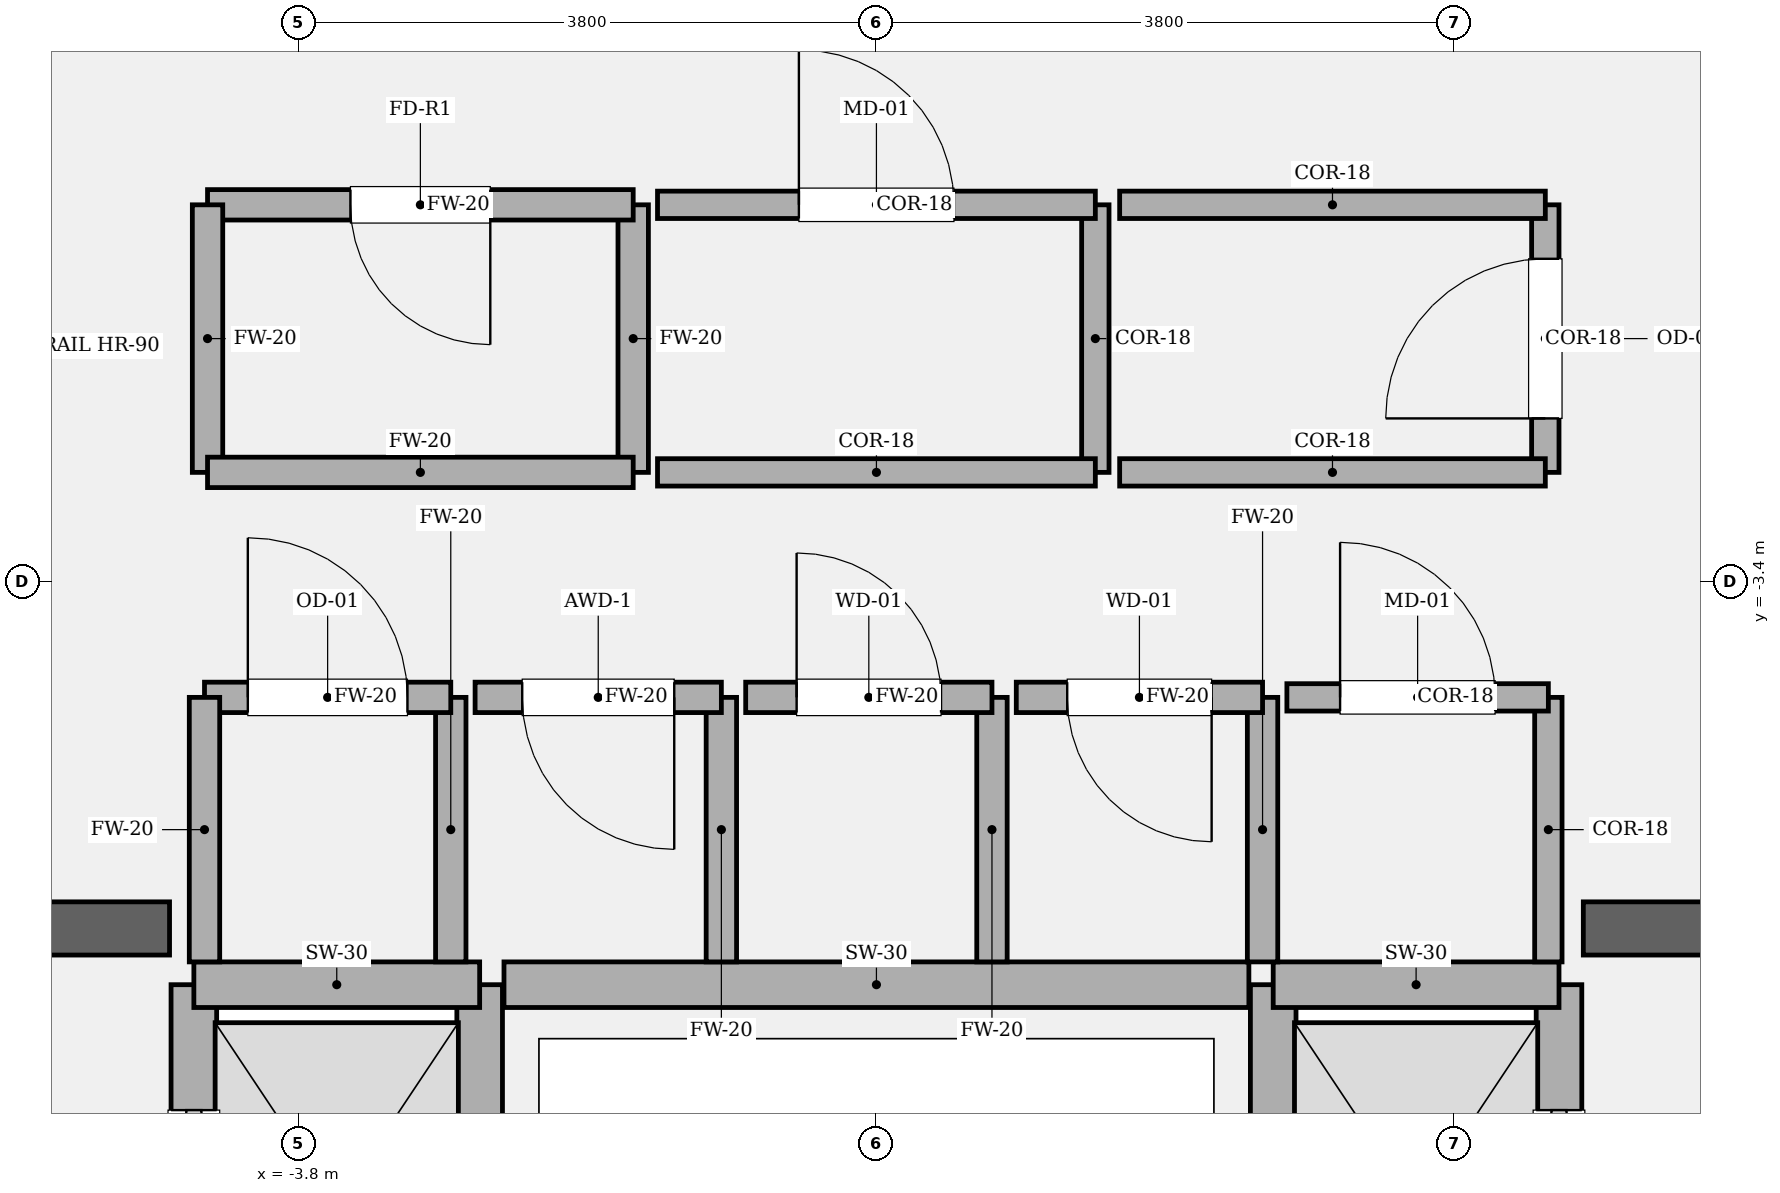
"""IFC4 building model, lengths in metres.
Left out: names, types, materials, properties, quantities, classifications, styles, units other than length and angle.
Written with IfcOpenShell. Run it as: python <this file> out.ifc"""

import sys

from ifc_helpers import new_model, si_unit, direction, frame, frame_2d, origin, place, context, subcontext, project, spatial, rectangle, extrude, element, fill, save


model = new_model("IFC4")
c1 = context("Model", 3, precision=1e-05, world=origin(), true_north=direction((0.0, 1.0)))
c2 = subcontext(c1, "Body", "Model", "MODEL_VIEW")
j1 = project(units=[si_unit("LENGTHUNIT", "METRE"), si_unit("PLANEANGLEUNIT", "RADIAN")], contexts=[c1])
p1 = place(None, origin())
s1 = spatial("IfcSite", under=j1, at=p1, CompositionType="ELEMENT")
p2 = place(p1, origin())
s2 = spatial("IfcBuilding", under=s1, at=p2, CompositionType="ELEMENT")
p3 = place(p2, frame((0.0, 0.0, 212.7)))
s3 = spatial("IfcBuildingStorey", under=s2, at=p3, CompositionType="ELEMENT", Elevation=212.7)
p4 = place(p3, frame((-9.875, -5.68, 0.0), z_axis=(0.0, 0.0, 1.0), x_axis=(1.0, 0.0, 0.0)))
e1 = element("IfcWall", 1, at=p4, inside=s3, PredefinedType="SOLIDWALL", context=c2, shape_type="SweptSolid", body=[
    extrude(rectangle(XDim=5.225, YDim=0.35, at=frame_2d((2.613, 0.0))), origin(), (0.0, 0.0, 1.0), 4.05),
])
p5 = place(p4, frame((1.335, 0.0, 0.0)))
e2 = element("IfcOpeningElement", 2, at=p5, cuts=e1, PredefinedType="OPENING", context=c2, shape_type="SweptSolid", body=[
    extrude(rectangle(XDim=1.18, YDim=2.2, at=frame_2d((0.59, 1.1))), frame((0.0, 0.185, 0.0), z_axis=(0.0, -1.0, 0.0), x_axis=(1.0, 0.0, 0.0)), (0.0, 0.0, 1.0), 0.37),
])
p6 = place(p3, frame((4.65, -5.68, 0.0), z_axis=(0.0, 0.0, 1.0), x_axis=(1.0, 0.0, 0.0)))
e3 = element("IfcWall", 3, at=p6, inside=s3, PredefinedType="SOLIDWALL", context=c2, shape_type="SweptSolid", body=[
    extrude(rectangle(XDim=5.225, YDim=0.35, at=frame_2d((2.613, 0.0))), origin(), (0.0, 0.0, 1.0), 4.05),
])
p7 = place(p6, frame((2.71, 0.0, 0.0)))
e4 = element("IfcOpeningElement", 4, at=p7, cuts=e3, PredefinedType="OPENING", context=c2, shape_type="SweptSolid", body=[
    extrude(rectangle(XDim=1.18, YDim=2.2, at=frame_2d((0.59, 1.1))), frame((0.0, 0.185, 0.0), z_axis=(0.0, -1.0, 0.0), x_axis=(1.0, 0.0, 0.0)), (0.0, 0.0, 1.0), 0.37),
])
p8 = place(p3, frame((-4.49, -8.82, 0.0), z_axis=(0.0, 0.0, 1.0), x_axis=(0.0, 1.0, 0.0)))
e5 = element("IfcWall", 5, at=p8, inside=s3, PredefinedType="SOLIDWALL", context=c2, shape_type="SweptSolid", body=[
    extrude(rectangle(XDim=2.77, YDim=0.3, at=frame_2d((1.385, 0.0))), origin(), (0.0, 0.0, 1.0), 3.83),
])
p9 = place(p8, frame((0.825, 0.0, 0.0)))
e6 = element("IfcOpeningElement", 6, at=p9, cuts=e5, PredefinedType="OPENING", context=c2, shape_type="SweptSolid", body=[
    extrude(rectangle(XDim=1.12, YDim=2.25, at=frame_2d((0.56, 1.125))), frame((0.0, 0.16, 0.0), z_axis=(0.0, -1.0, 0.0), x_axis=(1.0, 0.0, 0.0)), (0.0, 0.0, 1.0), 0.32),
])
p10 = place(p3, frame((-2.61, -8.82, 0.0), z_axis=(0.0, 0.0, 1.0), x_axis=(0.0, 1.0, 0.0)))
e7 = element("IfcWall", 7, at=p10, inside=s3, PredefinedType="SOLIDWALL", context=c2, shape_type="SweptSolid", body=[
    extrude(rectangle(XDim=2.77, YDim=0.3, at=frame_2d((1.385, 0.0))), origin(), (0.0, 0.0, 1.0), 3.83),
])
p11 = place(p3, frame((-4.49, -6.05, 0.0), z_axis=(0.0, 0.0, 1.0), x_axis=(1.0, 0.0, 0.0)))
e8 = element("IfcWall", 8, at=p11, inside=s3, PredefinedType="SOLIDWALL", context=c2, shape_type="SweptSolid", body=[
    extrude(rectangle(XDim=1.88, YDim=0.3, at=frame_2d((0.94, 0.0))), origin(), (0.0, 0.0, 1.0), 3.83),
])
p12 = place(p3, frame((4.49, -8.82, 0.0), z_axis=(0.0, 0.0, 1.0), x_axis=(0.0, 1.0, 0.0)))
e9 = element("IfcWall", 9, at=p12, inside=s3, PredefinedType="SOLIDWALL", context=c2, shape_type="SweptSolid", body=[
    extrude(rectangle(XDim=2.77, YDim=0.3, at=frame_2d((1.385, 0.0))), origin(), (0.0, 0.0, 1.0), 3.83),
])
p13 = place(p12, frame((0.825, 0.0, 0.0)))
e10 = element("IfcOpeningElement", 10, at=p13, cuts=e9, PredefinedType="OPENING", context=c2, shape_type="SweptSolid", body=[
    extrude(rectangle(XDim=1.12, YDim=2.25, at=frame_2d((0.56, 1.125))), frame((0.0, 0.16, 0.0), z_axis=(0.0, -1.0, 0.0), x_axis=(1.0, 0.0, 0.0)), (0.0, 0.0, 1.0), 0.32),
])
p14 = place(p3, frame((2.61, -8.82, 0.0), z_axis=(0.0, 0.0, 1.0), x_axis=(0.0, 1.0, 0.0)))
e11 = element("IfcWall", 11, at=p14, inside=s3, PredefinedType="SOLIDWALL", context=c2, shape_type="SweptSolid", body=[
    extrude(rectangle(XDim=2.77, YDim=0.3, at=frame_2d((1.385, 0.0))), origin(), (0.0, 0.0, 1.0), 3.83),
])
p15 = place(p3, frame((2.61, -6.05, 0.0), z_axis=(0.0, 0.0, 1.0), x_axis=(1.0, 0.0, 0.0)))
e12 = element("IfcWall", 12, at=p15, inside=s3, PredefinedType="SOLIDWALL", context=c2, shape_type="SweptSolid", body=[
    extrude(rectangle(XDim=1.88, YDim=0.3, at=frame_2d((0.94, 0.0))), origin(), (0.0, 0.0, 1.0), 3.83),
])
p16 = place(p3, frame((-2.45, -6.05, 0.0), z_axis=(0.0, 0.0, 1.0), x_axis=(1.0, 0.0, 0.0)))
e13 = element("IfcWall", 13, at=p16, inside=s3, PredefinedType="SOLIDWALL", context=c2, shape_type="SweptSolid", body=[
    extrude(rectangle(XDim=4.9, YDim=0.3, at=frame_2d((2.45, 0.0))), origin(), (0.0, 0.0, 1.0), 3.83),
])
p17 = place(p3, frame((-2.8, -5.9, 0.0), z_axis=(0.0, 0.0, 1.0), x_axis=(0.0, 1.0, 0.0)))
e14 = element("IfcWall", 14, at=p17, inside=s3, PredefinedType="SOLIDWALL", context=c2, shape_type="SweptSolid", body=[
    extrude(rectangle(XDim=1.74, YDim=0.2, at=frame_2d((0.87, 0.0))), origin(), (0.0, 0.0, 1.0), 3.83),
])
p18 = place(p3, frame((-2.8, -4.16, 0.0), z_axis=(0.0, 0.0, 1.0), x_axis=(-1.0, 0.0, 0.0)))
e15 = element("IfcWall", 15, at=p18, inside=s3, PredefinedType="SOLIDWALL", context=c2, shape_type="SweptSolid", body=[
    extrude(rectangle(XDim=1.62, YDim=0.2, at=frame_2d((0.81, 0.0))), origin(), (0.0, 0.0, 1.0), 3.83),
])
p19 = place(p18, frame((0.285, 0.0, 0.0)))
e16 = element("IfcOpeningElement", 16, at=p19, cuts=e15, PredefinedType="OPENING", context=c2, shape_type="SweptSolid", body=[
    extrude(rectangle(XDim=1.05, YDim=2.2, at=frame_2d((0.525, 1.1))), frame((0.0, 0.11, 0.0), z_axis=(0.0, -1.0, 0.0), x_axis=(1.0, 0.0, 0.0)), (0.0, 0.0, 1.0), 0.22),
])
for number, where, z_axis, x_axis in (
    (17, (-4.42, -4.16, 0.0), (0.0, 0.0, 1.0), (0.0, -1.0, 0.0)),
    (18, (-1.02, -5.9, 0.0), (0.0, 0.0, 1.0), (0.0, 1.0, 0.0)),
):
    element("IfcWall", number, at=place(p3, frame(where, z_axis=z_axis, x_axis=x_axis)), inside=s3, PredefinedType="SOLIDWALL", context=c2, shape_type="SweptSolid", body=[
        extrude(rectangle(XDim=1.74, YDim=0.2, at=frame_2d((0.87, 0.0))), origin(), (0.0, 0.0, 1.0), 3.83),
    ])
p20 = place(p3, frame((-1.02, -4.16, 0.0), z_axis=(0.0, 0.0, 1.0), x_axis=(-1.0, 0.0, 0.0)))
e19 = element("IfcWall", 19, at=p20, inside=s3, PredefinedType="SOLIDWALL", context=c2, shape_type="SweptSolid", body=[
    extrude(rectangle(XDim=1.62, YDim=0.2, at=frame_2d((0.81, 0.0))), origin(), (0.0, 0.0, 1.0), 3.83),
])
p21 = place(p20, frame((0.31, 0.0, 0.0)))
e20 = element("IfcOpeningElement", 20, at=p21, cuts=e19, PredefinedType="OPENING", context=c2, shape_type="SweptSolid", body=[
    extrude(rectangle(XDim=1.0, YDim=2.15, at=frame_2d((0.5, 1.075))), frame((0.0, 0.11, 0.0), z_axis=(0.0, -1.0, 0.0), x_axis=(1.0, 0.0, 0.0)), (0.0, 0.0, 1.0), 0.22),
])
p22 = place(p3, frame((0.76, -5.9, 0.0), z_axis=(0.0, 0.0, 1.0), x_axis=(0.0, 1.0, 0.0)))
e21 = element("IfcWall", 21, at=p22, inside=s3, PredefinedType="SOLIDWALL", context=c2, shape_type="SweptSolid", body=[
    extrude(rectangle(XDim=1.74, YDim=0.2, at=frame_2d((0.87, 0.0))), origin(), (0.0, 0.0, 1.0), 3.83),
])
p23 = place(p3, frame((0.76, -4.16, 0.0), z_axis=(0.0, 0.0, 1.0), x_axis=(-1.0, 0.0, 0.0)))
e22 = element("IfcWall", 22, at=p23, inside=s3, PredefinedType="SOLIDWALL", context=c2, shape_type="SweptSolid", body=[
    extrude(rectangle(XDim=1.62, YDim=0.2, at=frame_2d((0.81, 0.0))), origin(), (0.0, 0.0, 1.0), 3.83),
])
p24 = place(p23, frame((0.335, 0.0, 0.0)))
e23 = element("IfcOpeningElement", 23, at=p24, cuts=e22, PredefinedType="OPENING", context=c2, shape_type="SweptSolid", body=[
    extrude(rectangle(XDim=0.95, YDim=2.15, at=frame_2d((0.475, 1.075))), frame((0.0, 0.11, 0.0), z_axis=(0.0, -1.0, 0.0), x_axis=(1.0, 0.0, 0.0)), (0.0, 0.0, 1.0), 0.22),
])
p25 = place(p3, frame((2.54, -5.9, 0.0), z_axis=(0.0, 0.0, 1.0), x_axis=(0.0, 1.0, 0.0)))
e24 = element("IfcWall", 24, at=p25, inside=s3, PredefinedType="SOLIDWALL", context=c2, shape_type="SweptSolid", body=[
    extrude(rectangle(XDim=1.74, YDim=0.2, at=frame_2d((0.87, 0.0))), origin(), (0.0, 0.0, 1.0), 3.83),
])
p26 = place(p3, frame((2.54, -4.16, 0.0), z_axis=(0.0, 0.0, 1.0), x_axis=(-1.0, 0.0, 0.0)))
e25 = element("IfcWall", 25, at=p26, inside=s3, PredefinedType="SOLIDWALL", context=c2, shape_type="SweptSolid", body=[
    extrude(rectangle(XDim=1.62, YDim=0.2, at=frame_2d((0.81, 0.0))), origin(), (0.0, 0.0, 1.0), 3.83),
])
p27 = place(p26, frame((0.335, 0.0, 0.0)))
e26 = element("IfcOpeningElement", 26, at=p27, cuts=e25, PredefinedType="OPENING", context=c2, shape_type="SweptSolid", body=[
    extrude(rectangle(XDim=0.95, YDim=2.15, at=frame_2d((0.475, 1.075))), frame((0.0, 0.11, 0.0), z_axis=(0.0, -1.0, 0.0), x_axis=(1.0, 0.0, 0.0)), (0.0, 0.0, 1.0), 0.22),
])
p28 = place(p3, frame((4.42, -5.9, 0.0), z_axis=(0.0, 0.0, 1.0), x_axis=(0.0, 1.0, 0.0)))
e27 = element("IfcWall", 27, at=p28, inside=s3, PredefinedType="PARTITIONING", context=c2, shape_type="SweptSolid", body=[
    extrude(rectangle(XDim=1.74, YDim=0.18, at=frame_2d((0.87, 0.0))), origin(), (0.0, 0.0, 1.0), 3.83),
])
p29 = place(p3, frame((4.42, -4.16, 0.0), z_axis=(0.0, 0.0, 1.0), x_axis=(-1.0, 0.0, 0.0)))
e28 = element("IfcWall", 28, at=p29, inside=s3, PredefinedType="PARTITIONING", context=c2, shape_type="SweptSolid", body=[
    extrude(rectangle(XDim=1.72, YDim=0.18, at=frame_2d((0.86, 0.0))), origin(), (0.0, 0.0, 1.0), 3.83),
])
p30 = place(p29, frame((0.35, 0.0, 0.0)))
e29 = element("IfcOpeningElement", 29, at=p30, cuts=e28, PredefinedType="OPENING", context=c2, shape_type="SweptSolid", body=[
    extrude(rectangle(XDim=1.02, YDim=2.2, at=frame_2d((0.51, 1.1))), frame((0.0, 0.1, 0.0), z_axis=(0.0, -1.0, 0.0), x_axis=(1.0, 0.0, 0.0)), (0.0, 0.0, 1.0), 0.2),
])
p31 = place(p3, frame((-1.6, -2.68, 0.0), z_axis=(0.0, 0.0, 1.0), x_axis=(0.0, 1.0, 0.0)))
e30 = element("IfcWall", 30, at=p31, inside=s3, PredefinedType="SOLIDWALL", context=c2, shape_type="SweptSolid", body=[
    extrude(rectangle(XDim=1.76, YDim=0.2, at=frame_2d((0.88, 0.0))), origin(), (0.0, 0.0, 1.0), 3.83),
])
p32 = place(p3, frame((-1.6, -0.92, 0.0), z_axis=(0.0, 0.0, 1.0), x_axis=(-1.0, 0.0, 0.0)))
e31 = element("IfcWall", 31, at=p32, inside=s3, PredefinedType="SOLIDWALL", context=c2, shape_type="SweptSolid", body=[
    extrude(rectangle(XDim=2.8, YDim=0.2, at=frame_2d((1.4, 0.0))), origin(), (0.0, 0.0, 1.0), 3.83),
])
p33 = place(p32, frame((0.94, 0.0, 0.0)))
e32 = element("IfcOpeningElement", 32, at=p33, cuts=e31, PredefinedType="OPENING", context=c2, shape_type="SweptSolid", body=[
    extrude(rectangle(XDim=0.92, YDim=2.1, at=frame_2d((0.46, 1.05))), frame((0.0, 0.11, 0.0), z_axis=(0.0, -1.0, 0.0), x_axis=(1.0, 0.0, 0.0)), (0.0, 0.0, 1.0), 0.22),
])
p34 = place(p3, frame((-4.4, -0.92, 0.0), z_axis=(0.0, 0.0, 1.0), x_axis=(0.0, -1.0, 0.0)))
e33 = element("IfcWall", 33, at=p34, inside=s3, PredefinedType="SOLIDWALL", context=c2, shape_type="SweptSolid", body=[
    extrude(rectangle(XDim=1.76, YDim=0.2, at=frame_2d((0.88, 0.0))), origin(), (0.0, 0.0, 1.0), 3.83),
])
p35 = place(p3, frame((-4.4, -2.68, 0.0), z_axis=(0.0, 0.0, 1.0), x_axis=(1.0, 0.0, 0.0)))
e34 = element("IfcWall", 34, at=p35, inside=s3, PredefinedType="SOLIDWALL", context=c2, shape_type="SweptSolid", body=[
    extrude(rectangle(XDim=2.8, YDim=0.2, at=frame_2d((1.4, 0.0))), origin(), (0.0, 0.0, 1.0), 3.83),
])
p36 = place(p3, frame((1.44, -2.68, 0.0), z_axis=(0.0, 0.0, 1.0), x_axis=(0.0, 1.0, 0.0)))
e35 = element("IfcWall", 35, at=p36, inside=s3, PredefinedType="PARTITIONING", context=c2, shape_type="SweptSolid", body=[
    extrude(rectangle(XDim=1.76, YDim=0.18, at=frame_2d((0.88, 0.0))), origin(), (0.0, 0.0, 1.0), 3.83),
])
p37 = place(p3, frame((1.44, -0.92, 0.0), z_axis=(0.0, 0.0, 1.0), x_axis=(-1.0, 0.0, 0.0)))
e36 = element("IfcWall", 36, at=p37, inside=s3, PredefinedType="PARTITIONING", context=c2, shape_type="SweptSolid", body=[
    extrude(rectangle(XDim=2.88, YDim=0.18, at=frame_2d((1.44, 0.0))), origin(), (0.0, 0.0, 1.0), 3.83),
])
p38 = place(p37, frame((0.93, 0.0, 0.0)))
e37 = element("IfcOpeningElement", 37, at=p38, cuts=e36, PredefinedType="OPENING", context=c2, shape_type="SweptSolid", body=[
    extrude(rectangle(XDim=1.02, YDim=2.2, at=frame_2d((0.51, 1.1))), frame((0.0, 0.1, 0.0), z_axis=(0.0, -1.0, 0.0), x_axis=(1.0, 0.0, 0.0)), (0.0, 0.0, 1.0), 0.2),
])
p39 = place(p3, frame((-1.44, -2.68, 0.0), z_axis=(0.0, 0.0, 1.0), x_axis=(1.0, 0.0, 0.0)))
e38 = element("IfcWall", 38, at=p39, inside=s3, PredefinedType="PARTITIONING", context=c2, shape_type="SweptSolid", body=[
    extrude(rectangle(XDim=2.88, YDim=0.18, at=frame_2d((1.44, 0.0))), origin(), (0.0, 0.0, 1.0), 3.83),
])
p40 = place(p3, frame((4.4, -2.68, 0.0), z_axis=(0.0, 0.0, 1.0), x_axis=(0.0, 1.0, 0.0)))
e39 = element("IfcWall", 39, at=p40, inside=s3, PredefinedType="PARTITIONING", context=c2, shape_type="SweptSolid", body=[
    extrude(rectangle(XDim=1.76, YDim=0.18, at=frame_2d((0.88, 0.0))), origin(), (0.0, 0.0, 1.0), 3.83),
])
p41 = place(p40, frame((0.355, 0.0, 0.0)))
e40 = element("IfcOpeningElement", 40, at=p41, cuts=e39, PredefinedType="OPENING", context=c2, shape_type="SweptSolid", body=[
    extrude(rectangle(XDim=1.05, YDim=2.2, at=frame_2d((0.525, 1.1))), frame((0.0, 0.1, 0.0), z_axis=(0.0, -1.0, 0.0), x_axis=(1.0, 0.0, 0.0)), (0.0, 0.0, 1.0), 0.2),
])
for number, where, z_axis, x_axis in (
    (41, (4.4, -0.92, 0.0), (0.0, 0.0, 1.0), (-1.0, 0.0, 0.0)),
    (42, (1.6, -2.68, 0.0), (0.0, 0.0, 1.0), (1.0, 0.0, 0.0)),
):
    element("IfcWall", number, at=place(p3, frame(where, z_axis=z_axis, x_axis=x_axis)), inside=s3, PredefinedType="PARTITIONING", context=c2, shape_type="SweptSolid", body=[
        extrude(rectangle(XDim=2.8, YDim=0.18, at=frame_2d((1.4, 0.0))), origin(), (0.0, 0.0, 1.0), 3.83),
    ])
p42 = place(p9, origin())
e43 = element("IfcDoor", 43, at=p42, inside=s3, OperationType="SLIDING_TO_LEFT", PredefinedType="DOOR", context=c2, shape_type="SweptSolid", body=[
    extrude(rectangle(XDim=1.12, YDim=2.25, at=frame_2d((0.56, 1.125))), frame((0.0, 0.025, 0.0), z_axis=(0.0, -1.0, 0.0), x_axis=(1.0, 0.0, 0.0)), (0.0, 0.0, 1.0), 0.05),
])
fill(e6, e43)
p43 = place(p13, origin())
e44 = element("IfcDoor", 44, at=p43, inside=s3, OperationType="SLIDING_TO_RIGHT", PredefinedType="DOOR", context=c2, shape_type="SweptSolid", body=[
    extrude(rectangle(XDim=1.12, YDim=2.25, at=frame_2d((0.56, 1.125))), frame((0.0, 0.025, 0.0), z_axis=(0.0, -1.0, 0.0), x_axis=(1.0, 0.0, 0.0)), (0.0, 0.0, 1.0), 0.05),
])
fill(e10, e44)
p44 = place(p19, origin())
e45 = element("IfcDoor", 45, at=p44, inside=s3, OperationType="SINGLE_SWING_RIGHT", PredefinedType="DOOR", context=c2, shape_type="SweptSolid", body=[
    extrude(rectangle(XDim=1.05, YDim=2.2, at=frame_2d((0.525, 1.1))), frame((0.0, 0.025, 0.0), z_axis=(0.0, -1.0, 0.0), x_axis=(1.0, 0.0, 0.0)), (0.0, 0.0, 1.0), 0.05),
])
fill(e16, e45)
p45 = place(p21, origin())
e46 = element("IfcDoor", 46, at=p45, inside=s3, OperationType="SINGLE_SWING_LEFT", PredefinedType="DOOR", context=c2, shape_type="SweptSolid", body=[
    extrude(rectangle(XDim=1.0, YDim=2.15, at=frame_2d((0.5, 1.075))), frame((0.0, 0.025, 0.0), z_axis=(0.0, -1.0, 0.0), x_axis=(1.0, 0.0, 0.0)), (0.0, 0.0, 1.0), 0.05),
])
fill(e20, e46)
p46 = place(p24, origin())
e47 = element("IfcDoor", 47, at=p46, inside=s3, OperationType="SINGLE_SWING_RIGHT", PredefinedType="DOOR", context=c2, shape_type="SweptSolid", body=[
    extrude(rectangle(XDim=0.95, YDim=2.15, at=frame_2d((0.475, 1.075))), frame((0.0, 0.025, 0.0), z_axis=(0.0, -1.0, 0.0), x_axis=(1.0, 0.0, 0.0)), (0.0, 0.0, 1.0), 0.05),
])
fill(e23, e47)
p47 = place(p27, origin())
e48 = element("IfcDoor", 48, at=p47, inside=s3, OperationType="SINGLE_SWING_LEFT", PredefinedType="DOOR", context=c2, shape_type="SweptSolid", body=[
    extrude(rectangle(XDim=0.95, YDim=2.15, at=frame_2d((0.475, 1.075))), frame((0.0, 0.025, 0.0), z_axis=(0.0, -1.0, 0.0), x_axis=(1.0, 0.0, 0.0)), (0.0, 0.0, 1.0), 0.05),
])
fill(e26, e48)
p48 = place(p30, origin())
e49 = element("IfcDoor", 49, at=p48, inside=s3, OperationType="SINGLE_SWING_RIGHT", PredefinedType="DOOR", context=c2, shape_type="SweptSolid", body=[
    extrude(rectangle(XDim=1.02, YDim=2.2, at=frame_2d((0.51, 1.1))), frame((0.0, 0.025, 0.0), z_axis=(0.0, -1.0, 0.0), x_axis=(1.0, 0.0, 0.0)), (0.0, 0.0, 1.0), 0.05),
])
fill(e29, e49)
p49 = place(p33, origin())
e50 = element("IfcDoor", 50, at=p49, inside=s3, OperationType="SINGLE_SWING_LEFT", PredefinedType="DOOR", context=c2, shape_type="SweptSolid", body=[
    extrude(rectangle(XDim=0.92, YDim=2.1, at=frame_2d((0.46, 1.05))), frame((0.0, 0.025, 0.0), z_axis=(0.0, -1.0, 0.0), x_axis=(1.0, 0.0, 0.0)), (0.0, 0.0, 1.0), 0.05),
])
fill(e32, e50)
p50 = place(p38, origin())
e51 = element("IfcDoor", 51, at=p50, inside=s3, OperationType="SINGLE_SWING_RIGHT", PredefinedType="DOOR", context=c2, shape_type="SweptSolid", body=[
    extrude(rectangle(XDim=1.02, YDim=2.2, at=frame_2d((0.51, 1.1))), frame((0.0, 0.025, 0.0), z_axis=(0.0, -1.0, 0.0), x_axis=(1.0, 0.0, 0.0)), (0.0, 0.0, 1.0), 0.05),
])
fill(e37, e51)
p51 = place(p41, origin())
e52 = element("IfcDoor", 52, at=p51, inside=s3, OperationType="SINGLE_SWING_LEFT", PredefinedType="DOOR", context=c2, shape_type="SweptSolid", body=[
    extrude(rectangle(XDim=1.05, YDim=2.2, at=frame_2d((0.525, 1.1))), frame((0.0, 0.025, 0.0), z_axis=(0.0, -1.0, 0.0), x_axis=(1.0, 0.0, 0.0)), (0.0, 0.0, 1.0), 0.05),
])
fill(e40, e52)
save(model, sys.argv[1])
